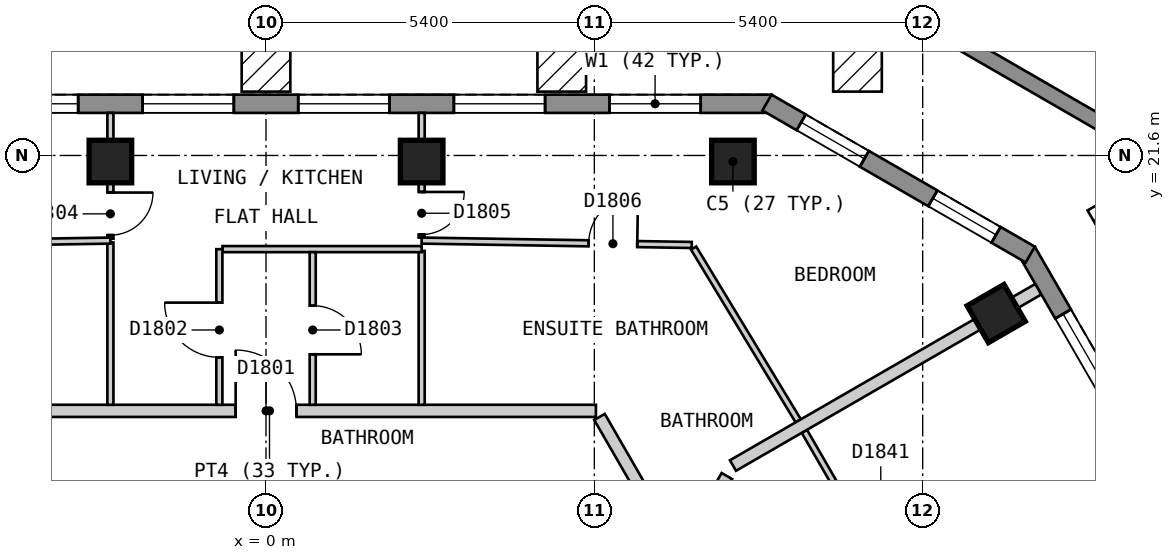
"""IFC4 building model, lengths in metres.
Left out: names, types, materials, properties, quantities, classifications, styles, units other than length and angle.
Written with IfcOpenShell. Run it as: python <this file> out.ifc"""

import sys

from ifc_helpers import new_model, si_unit, direction, frame, frame_2d, origin, origin_2d, place, context, subcontext, project, spatial, polyline, rectangle, outline, extrude, element, fill, save


model = new_model("IFC4")
c1 = context("Model", 3, precision=1e-05, world=origin(), true_north=direction((0.0, 1.0)))
c2 = subcontext(c1, "Body", "Model", "MODEL_VIEW")
j1 = project(units=[si_unit("LENGTHUNIT", "METRE"), si_unit("PLANEANGLEUNIT", "RADIAN")], contexts=[c1])
p1 = place(None, origin())
s1 = spatial("IfcSite", under=j1, at=p1, CompositionType="ELEMENT")
p2 = place(p1, origin())
s2 = spatial("IfcBuilding", under=s1, at=p2, CompositionType="ELEMENT")
p3 = place(p2, frame((0.0, 0.0, 202.8)))
s3 = spatial("IfcBuildingStorey", under=s2, at=p3, CompositionType="ELEMENT", Elevation=202.8)
for number, where, z_axis, x_axis in (
    (1, (7.679, 21.5, 0.0), (0.0, 0.0, 1.0), (-1.0, 0.0, 0.0)),
    (2, (2.56, 21.5, 0.0), (0.0, 0.0, 1.0), (-1.0, 0.0, 0.0)),
    (3, (-2.559, 21.5, 0.0), (0.0, 0.0, 1.0), (-1.0, 0.0, 0.0)),
    (4, (12.009, 19.0, 0.0), (0.0, 0.0, 1.0), (-0.5, 0.866, 0.0)),
):
    element("IfcColumn", number, at=place(p3, frame(where, z_axis=z_axis, x_axis=x_axis)), inside=s3, PredefinedType="COLUMN", context=c2, shape_type="SweptSolid", body=[
        extrude(rectangle(XDim=0.7, YDim=0.7, at=origin_2d()), origin(), (0.0, 0.0, 1.0), 3.0),
    ])
p4 = place(p3, frame((8.314, 22.45, 0.0), z_axis=(0.0, 0.0, 1.0), x_axis=(-1.0, 0.0, 0.0)))
e5 = element("IfcWall", 5, at=p4, inside=s3, PredefinedType="SOLIDWALL", context=c2, shape_type="SweptSolid", body=[
    extrude(outline(polyline([(0.0, -0.15), (16.628, -0.15), (16.548, 0.15), (0.08, 0.15), (0.0, -0.15)])), origin(), (0.0, 0.0, 1.0), 2.7),
])
p5 = place(p4, frame((1.165, 0.0, 0.15)))
e6 = element("IfcOpeningElement", 6, at=p5, cuts=e5, PredefinedType="OPENING", context=c2, shape_type="SweptSolid", body=[
    extrude(rectangle(XDim=1.5, YDim=2.1, at=frame_2d((0.75, 1.05))), frame((0.0, 0.16, 0.0), z_axis=(0.0, -1.0, 0.0), x_axis=(1.0, 0.0, 0.0)), (0.0, 0.0, 1.0), 0.32),
])
p6 = place(p4, frame((3.724, 0.0, 0.15)))
e7 = element("IfcOpeningElement", 7, at=p6, cuts=e5, PredefinedType="OPENING", context=c2, shape_type="SweptSolid", body=[
    extrude(rectangle(XDim=1.5, YDim=2.1, at=frame_2d((0.75, 1.05))), frame((0.0, 0.16, 0.0), z_axis=(0.0, -1.0, 0.0), x_axis=(1.0, 0.0, 0.0)), (0.0, 0.0, 1.0), 0.32),
])
p7 = place(p4, frame((6.284, 0.0, 0.15)))
e8 = element("IfcOpeningElement", 8, at=p7, cuts=e5, PredefinedType="OPENING", context=c2, shape_type="SweptSolid", body=[
    extrude(rectangle(XDim=1.5, YDim=2.1, at=frame_2d((0.75, 1.05))), frame((0.0, 0.16, 0.0), z_axis=(0.0, -1.0, 0.0), x_axis=(1.0, 0.0, 0.0)), (0.0, 0.0, 1.0), 0.32),
])
p8 = place(p4, frame((8.843, 0.0, 0.15)))
e9 = element("IfcOpeningElement", 9, at=p8, cuts=e5, PredefinedType="OPENING", context=c2, shape_type="SweptSolid", body=[
    extrude(rectangle(XDim=1.5, YDim=2.1, at=frame_2d((0.75, 1.05))), frame((0.0, 0.16, 0.0), z_axis=(0.0, -1.0, 0.0), x_axis=(1.0, 0.0, 0.0)), (0.0, 0.0, 1.0), 0.32),
])
p9 = place(p4, frame((11.403, 0.0, 0.15)))
e10 = element("IfcOpeningElement", 10, at=p9, cuts=e5, PredefinedType="OPENING", context=c2, shape_type="SweptSolid", body=[
    extrude(rectangle(XDim=1.5, YDim=2.1, at=frame_2d((0.75, 1.05))), frame((0.0, 0.16, 0.0), z_axis=(0.0, -1.0, 0.0), x_axis=(1.0, 0.0, 0.0)), (0.0, 0.0, 1.0), 0.32),
])
p10 = place(p4, frame((13.962, 0.0, 0.15)))
e11 = element("IfcOpeningElement", 11, at=p10, cuts=e5, PredefinedType="OPENING", context=c2, shape_type="SweptSolid", body=[
    extrude(rectangle(XDim=1.5, YDim=2.1, at=frame_2d((0.75, 1.05))), frame((0.0, 0.16, 0.0), z_axis=(0.0, -1.0, 0.0), x_axis=(1.0, 0.0, 0.0)), (0.0, 0.0, 1.0), 0.32),
])
p11 = place(p3, frame((23.599, 0.825, 0.0), z_axis=(0.0, 0.0, 1.0), x_axis=(-0.500003656944, 0.866023292436, 0.0)))
e12 = element("IfcWall", 12, at=p11, inside=s3, PredefinedType="SOLIDWALL", context=c2, shape_type="SweptSolid", body=[
    extrude(outline(polyline([(0.0, -0.15), (22.17, -0.15), (22.09, 0.15), (0.08, 0.15), (0.0, -0.15)])), origin(), (0.0, 0.0, 1.0), 2.7),
])
p12 = place(p11, frame((1.191, 0.0, 0.15)))
e13 = element("IfcOpeningElement", 13, at=p12, cuts=e12, PredefinedType="OPENING", context=c2, shape_type="SweptSolid", body=[
    extrude(rectangle(XDim=1.5, YDim=2.1, at=frame_2d((0.75, 1.05))), frame((0.0, 0.16, 0.0), z_axis=(0.0, -1.0, 0.0), x_axis=(1.0, 0.0, 0.0)), (0.0, 0.0, 1.0), 0.32),
])
p13 = place(p11, frame((3.804, 0.0, 0.15)))
e14 = element("IfcOpeningElement", 14, at=p13, cuts=e12, PredefinedType="OPENING", context=c2, shape_type="SweptSolid", body=[
    extrude(rectangle(XDim=1.5, YDim=2.1, at=frame_2d((0.75, 1.05))), frame((0.0, 0.16, 0.0), z_axis=(0.0, -1.0, 0.0), x_axis=(1.0, 0.0, 0.0)), (0.0, 0.0, 1.0), 0.32),
])
p14 = place(p11, frame((6.417, 0.0, 0.15)))
e15 = element("IfcOpeningElement", 15, at=p14, cuts=e12, PredefinedType="OPENING", context=c2, shape_type="SweptSolid", body=[
    extrude(rectangle(XDim=1.5, YDim=2.1, at=frame_2d((0.75, 1.05))), frame((0.0, 0.16, 0.0), z_axis=(0.0, -1.0, 0.0), x_axis=(1.0, 0.0, 0.0)), (0.0, 0.0, 1.0), 0.32),
])
p15 = place(p11, frame((9.029, 0.0, 0.15)))
e16 = element("IfcOpeningElement", 16, at=p15, cuts=e12, PredefinedType="OPENING", context=c2, shape_type="SweptSolid", body=[
    extrude(rectangle(XDim=1.5, YDim=2.1, at=frame_2d((0.75, 1.05))), frame((0.0, 0.16, 0.0), z_axis=(0.0, -1.0, 0.0), x_axis=(1.0, 0.0, 0.0)), (0.0, 0.0, 1.0), 0.32),
])
p16 = place(p11, frame((11.641, 0.0, 0.15)))
e17 = element("IfcOpeningElement", 17, at=p16, cuts=e12, PredefinedType="OPENING", context=c2, shape_type="SweptSolid", body=[
    extrude(rectangle(XDim=1.5, YDim=2.1, at=frame_2d((0.75, 1.05))), frame((0.0, 0.16, 0.0), z_axis=(0.0, -1.0, 0.0), x_axis=(1.0, 0.0, 0.0)), (0.0, 0.0, 1.0), 0.32),
])
p17 = place(p11, frame((14.254, 0.0, 0.15)))
e18 = element("IfcOpeningElement", 18, at=p17, cuts=e12, PredefinedType="OPENING", context=c2, shape_type="SweptSolid", body=[
    extrude(rectangle(XDim=1.5, YDim=2.1, at=frame_2d((0.75, 1.05))), frame((0.0, 0.16, 0.0), z_axis=(0.0, -1.0, 0.0), x_axis=(1.0, 0.0, 0.0)), (0.0, 0.0, 1.0), 0.32),
])
p18 = place(p11, frame((16.866, 0.0, 0.15)))
e19 = element("IfcOpeningElement", 19, at=p18, cuts=e12, PredefinedType="OPENING", context=c2, shape_type="SweptSolid", body=[
    extrude(rectangle(XDim=1.5, YDim=2.1, at=frame_2d((0.75, 1.05))), frame((0.0, 0.16, 0.0), z_axis=(0.0, -1.0, 0.0), x_axis=(1.0, 0.0, 0.0)), (0.0, 0.0, 1.0), 0.32),
])
p19 = place(p11, frame((19.479, 0.0, 0.15)))
e20 = element("IfcOpeningElement", 20, at=p19, cuts=e12, PredefinedType="OPENING", context=c2, shape_type="SweptSolid", body=[
    extrude(rectangle(XDim=1.5, YDim=2.1, at=frame_2d((0.75, 1.05))), frame((0.0, 0.16, 0.0), z_axis=(0.0, -1.0, 0.0), x_axis=(1.0, 0.0, 0.0)), (0.0, 0.0, 1.0), 0.32),
])
p20 = place(p3, frame((12.569, 19.97, 0.0), z_axis=(0.0, 0.0, 1.0), x_axis=(-0.866022959057, 0.500004234368, 0.0)))
e21 = element("IfcWall", 21, at=p20, inside=s3, PredefinedType="SOLIDWALL", context=c2, shape_type="SweptSolid", body=[
    extrude(outline(polyline([(0.0, -0.15), (5.0, -0.15), (4.92, 0.15), (0.08, 0.15), (0.0, -0.15)])), origin(), (0.0, 0.0, 1.0), 2.7),
])
p21 = place(p20, frame((0.65, 0.0, 0.15)))
e22 = element("IfcOpeningElement", 22, at=p21, cuts=e21, PredefinedType="OPENING", context=c2, shape_type="SweptSolid", body=[
    extrude(rectangle(XDim=1.2, YDim=2.1, at=frame_2d((0.6, 1.05))), frame((0.0, 0.16, 0.0), z_axis=(0.0, -1.0, 0.0), x_axis=(1.0, 0.0, 0.0)), (0.0, 0.0, 1.0), 0.32),
])
p22 = place(p20, frame((3.15, 0.0, 0.15)))
e23 = element("IfcOpeningElement", 23, at=p22, cuts=e21, PredefinedType="OPENING", context=c2, shape_type="SweptSolid", body=[
    extrude(rectangle(XDim=1.2, YDim=2.1, at=frame_2d((0.6, 1.05))), frame((0.0, 0.16, 0.0), z_axis=(0.0, -1.0, 0.0), x_axis=(1.0, 0.0, 0.0)), (0.0, 0.0, 1.0), 0.32),
])
p23 = place(p3, frame((10.33, 24.092, 0.0), z_axis=(0.0, 0.0, 1.0), x_axis=(0.865877295069, -0.50025644412, 0.0)))
e24 = element("IfcWall", 24, at=p23, inside=s3, PredefinedType="PARAPET", context=c2, shape_type="SweptSolid", body=[
    extrude(outline(polyline([(0.067, -0.125), (4.932, -0.125), (4.999, 0.125), (0.0, 0.125), (0.067, -0.125)])), origin(), (0.0, 0.0, 1.0), 1.6),
])
p24 = place(p3, frame((5.485, 17.3, 0.0), z_axis=(0.0, 0.0, 1.0), x_axis=(0.499943285704, -0.866058145322, 0.0)))
e25 = element("IfcWall", 25, at=p24, inside=s3, PredefinedType="PARTITIONING", context=c2, shape_type="SweptSolid", body=[
    extrude(rectangle(XDim=10.623, YDim=0.2, at=frame_2d((5.312, 0.0))), origin(), (0.0, 0.0, 1.0), 2.7),
])
p25 = place(p24, frame((3.901, 0.0, 0.0)))
e26 = element("IfcOpeningElement", 26, at=p25, cuts=e25, PredefinedType="OPENING", context=c2, shape_type="SweptSolid", body=[
    extrude(rectangle(XDim=1.0, YDim=2.1, at=frame_2d((0.5, 1.05))), frame((0.0, 0.11, 0.0), z_axis=(0.0, -1.0, 0.0), x_axis=(1.0, 0.0, 0.0)), (0.0, 0.0, 1.0), 0.22),
])
p26 = place(p3, frame((-5.311, 17.4, 0.0), z_axis=(0.0, 0.0, 1.0), x_axis=(1.0, 0.0, 0.0)))
e27 = element("IfcWall", 27, at=p26, inside=s3, PredefinedType="PARTITIONING", context=c2, shape_type="SweptSolid", body=[
    extrude(rectangle(XDim=10.737, YDim=0.2, at=frame_2d((5.369, 0.0))), origin(), (0.0, 0.0, 1.0), 2.7),
])
p27 = place(p26, frame((4.812, 0.0, 0.0)))
e28 = element("IfcOpeningElement", 28, at=p27, cuts=e27, PredefinedType="OPENING", context=c2, shape_type="SweptSolid", body=[
    extrude(rectangle(XDim=1.0, YDim=2.1, at=frame_2d((0.5, 1.05))), frame((0.0, 0.11, 0.0), z_axis=(0.0, -1.0, 0.0), x_axis=(1.0, 0.0, 0.0)), (0.0, 0.0, 1.0), 0.22),
])
p28 = place(p3, frame((7.033, 20.077, 0.0), z_axis=(0.0, 0.0, 1.0), x_axis=(0.517918779664, -0.855429797044, 0.0)))
e29 = element("IfcWall", 29, at=p28, inside=s3, PredefinedType="PARTITIONING", context=c2, shape_type="SweptSolid", body=[
    extrude(rectangle(XDim=3.321, YDim=0.1, at=frame_2d((1.661, 0.0))), origin(), (0.0, 0.0, 1.0), 2.7),
])
p29 = place(p3, frame((8.854, 17.064, 0.0), z_axis=(0.0, 0.0, 1.0), x_axis=(0.500042049778, -0.866001124973, 0.0)))
e30 = element("IfcWall", 30, at=p29, inside=s3, PredefinedType="PARTITIONING", context=c2, shape_type="SweptSolid", body=[
    extrude(rectangle(XDim=5.025, YDim=0.1, at=frame_2d((2.513, 0.0))), origin(), (0.0, 0.0, 1.0), 2.7),
])
p30 = place(p29, frame((2.063, 0.0, 0.0)))
e31 = element("IfcOpeningElement", 31, at=p30, cuts=e30, PredefinedType="OPENING", context=c2, shape_type="SweptSolid", body=[
    extrude(rectangle(XDim=0.9, YDim=2.1, at=frame_2d((0.45, 1.05))), frame((0.0, 0.06, 0.0), z_axis=(0.0, -1.0, 0.0), x_axis=(1.0, 0.0, 0.0)), (0.0, 0.0, 1.0), 0.12),
])
p31 = place(p3, frame((-2.559, 20.17, 0.0), z_axis=(0.0, 0.0, 1.0), x_axis=(0.0, -1.0, 0.0)))
e32 = element("IfcWall", 32, at=p31, inside=s3, PredefinedType="PARTITIONING", context=c2, shape_type="SweptSolid", body=[
    extrude(rectangle(XDim=2.67, YDim=0.1, at=frame_2d((1.335, 0.0))), origin(), (0.0, 0.0, 1.0), 2.7),
])
p32 = place(p3, frame((2.56, 22.3, 0.0), z_axis=(0.0, 0.0, 1.0), x_axis=(0.0, -1.0, 0.0)))
e33 = element("IfcWall", 33, at=p32, inside=s3, PredefinedType="PARTITIONING", context=c2, shape_type="SweptSolid", body=[
    extrude(rectangle(XDim=2.05, YDim=0.1, at=frame_2d((1.025, 0.0))), origin(), (0.0, 0.0, 1.0), 2.7),
])
p33 = place(p32, frame((1.3, 0.0, 0.0)))
e34 = element("IfcOpeningElement", 34, at=p33, cuts=e33, PredefinedType="OPENING", context=c2, shape_type="SweptSolid", body=[
    extrude(rectangle(XDim=0.7, YDim=2.1, at=frame_2d((0.35, 1.05))), frame((0.0, 0.06, 0.0), z_axis=(0.0, -1.0, 0.0), x_axis=(1.0, 0.0, 0.0)), (0.0, 0.0, 1.0), 0.12),
])
p34 = place(p3, frame((2.56, 20.03, 0.0), z_axis=(0.0, 0.0, 1.0), x_axis=(0.0, -1.0, 0.0)))
e35 = element("IfcWall", 35, at=p34, inside=s3, PredefinedType="PARTITIONING", context=c2, shape_type="SweptSolid", body=[
    extrude(rectangle(XDim=2.53, YDim=0.1, at=frame_2d((1.265, 0.0))), origin(), (0.0, 0.0, 1.0), 2.7),
])
p35 = place(p3, frame((2.56, 20.2, 0.0), z_axis=(0.0, 0.0, 1.0), x_axis=(0.999868576801, -0.016212005615, 0.0)))
e36 = element("IfcWall", 36, at=p35, inside=s3, PredefinedType="PARTITIONING", context=c2, shape_type="SweptSolid", body=[
    extrude(rectangle(XDim=4.442, YDim=0.1, at=frame_2d((2.221, 0.0))), origin(), (0.0, 0.0, 1.0), 2.7),
])
p36 = place(p35, frame((2.746, 0.0, 0.0)))
e37 = element("IfcOpeningElement", 37, at=p36, cuts=e36, PredefinedType="OPENING", context=c2, shape_type="SweptSolid", body=[
    extrude(rectangle(XDim=0.8, YDim=2.1, at=frame_2d((0.4, 1.05))), frame((0.0, 0.06, 0.0), z_axis=(0.0, -1.0, 0.0), x_axis=(1.0, 0.0, 0.0)), (0.0, 0.0, 1.0), 0.12),
])
p37 = place(p3, frame((-0.716, 20.06, 0.0), z_axis=(0.0, 0.0, 1.0), x_axis=(1.0, 0.0, 0.0)))
e38 = element("IfcWall", 38, at=p37, inside=s3, PredefinedType="PARTITIONING", context=c2, shape_type="SweptSolid", body=[
    extrude(rectangle(XDim=3.276, YDim=0.1, at=frame_2d((1.638, 0.0))), origin(), (0.0, 0.0, 1.0), 2.7),
])
p38 = place(p3, frame((0.768, 17.5, 0.0), z_axis=(0.0, 0.0, 1.0), x_axis=(0.0, 1.0, 0.0)))
e39 = element("IfcWall", 39, at=p38, inside=s3, PredefinedType="PARTITIONING", context=c2, shape_type="SweptSolid", body=[
    extrude(rectangle(XDim=2.51, YDim=0.1, at=frame_2d((1.255, 0.0))), origin(), (0.0, 0.0, 1.0), 2.7),
])
p39 = place(p38, frame((0.83, 0.0, 0.0)))
e40 = element("IfcOpeningElement", 40, at=p39, cuts=e39, PredefinedType="OPENING", context=c2, shape_type="SweptSolid", body=[
    extrude(rectangle(XDim=0.8, YDim=2.1, at=frame_2d((0.4, 1.05))), frame((0.0, 0.06, 0.0), z_axis=(0.0, -1.0, 0.0), x_axis=(1.0, 0.0, 0.0)), (0.0, 0.0, 1.0), 0.12),
])
p40 = place(p3, frame((-0.767, 17.5, 0.0), z_axis=(0.0, 0.0, 1.0), x_axis=(0.0, 1.0, 0.0)))
e41 = element("IfcWall", 41, at=p40, inside=s3, PredefinedType="PARTITIONING", context=c2, shape_type="SweptSolid", body=[
    extrude(rectangle(XDim=2.559, YDim=0.1, at=frame_2d((1.28, 0.0))), origin(), (0.0, 0.0, 1.0), 2.7),
])
p41 = place(p40, frame((0.78, 0.0, 0.0)))
e42 = element("IfcOpeningElement", 42, at=p41, cuts=e41, PredefinedType="OPENING", context=c2, shape_type="SweptSolid", body=[
    extrude(rectangle(XDim=0.9, YDim=2.1, at=frame_2d((0.45, 1.05))), frame((0.0, 0.06, 0.0), z_axis=(0.0, -1.0, 0.0), x_axis=(1.0, 0.0, 0.0)), (0.0, 0.0, 1.0), 0.12),
])
p42 = place(p3, frame((-2.559, 20.23, 0.0), z_axis=(0.0, 0.0, 1.0), x_axis=(0.0, 1.0, 0.0)))
e43 = element("IfcWall", 43, at=p42, inside=s3, PredefinedType="PARTITIONING", context=c2, shape_type="SweptSolid", body=[
    extrude(rectangle(XDim=2.07, YDim=0.1, at=frame_2d((1.035, 0.0))), origin(), (0.0, 0.0, 1.0), 2.7),
])
p43 = place(p42, frame((0.06, 0.0, 0.0)))
e44 = element("IfcOpeningElement", 44, at=p43, cuts=e43, PredefinedType="OPENING", context=c2, shape_type="SweptSolid", body=[
    extrude(rectangle(XDim=0.7, YDim=2.1, at=frame_2d((0.35, 1.05))), frame((0.0, 0.06, 0.0), z_axis=(0.0, -1.0, 0.0), x_axis=(1.0, 0.0, 0.0)), (0.0, 0.0, 1.0), 0.12),
])
p44 = place(p3, frame((-7.002, 20.128, 0.0), z_axis=(0.0, 0.0, 1.0), x_axis=(0.999868634558, 0.016208443081, 0.0)))
e45 = element("IfcWall", 45, at=p44, inside=s3, PredefinedType="PARTITIONING", context=c2, shape_type="SweptSolid", body=[
    extrude(rectangle(XDim=4.443, YDim=0.1, at=frame_2d((2.222, 0.0))), origin(), (0.0, 0.0, 1.0), 2.7),
])
p45 = place(p44, frame((1.475, 0.0, 0.0)))
e46 = element("IfcOpeningElement", 46, at=p45, cuts=e45, PredefinedType="OPENING", context=c2, shape_type="SweptSolid", body=[
    extrude(rectangle(XDim=0.8, YDim=2.1, at=frame_2d((0.4, 1.05))), frame((0.0, 0.06, 0.0), z_axis=(0.0, -1.0, 0.0), x_axis=(1.0, 0.0, 0.0)), (0.0, 0.0, 1.0), 0.12),
])
p46 = place(p3, frame((6.871, 15.1, 0.0), z_axis=(0.0, 0.0, 1.0), x_axis=(0.50006528296, 0.865987709369, 0.0)))
e47 = element("IfcWall", 47, at=p46, inside=s3, PredefinedType="PARTITIONING", context=c2, shape_type="SweptSolid", body=[
    extrude(rectangle(XDim=1.418, YDim=0.2, at=frame_2d((0.709, 0.0))), origin(), (0.0, 0.0, 1.0), 2.7),
])
p47 = place(p3, frame((7.68, 16.501, 0.0), z_axis=(0.0, 0.0, 1.0), x_axis=(0.86602149507, 0.500006770031, 0.0)))
e48 = element("IfcWall", 48, at=p47, inside=s3, PredefinedType="PARTITIONING", context=c2, shape_type="SweptSolid", body=[
    extrude(rectangle(XDim=5.798, YDim=0.2, at=frame_2d((2.899, 0.0))), origin(), (0.0, 0.0, 1.0), 2.7),
])
p48 = place(p5, origin())
e49 = element("IfcWindow", 49, at=p48, inside=s3, PartitioningType="SINGLE_PANEL", PredefinedType="WINDOW", context=c2, shape_type="SweptSolid", body=[
    extrude(rectangle(XDim=1.5, YDim=2.1, at=frame_2d((0.75, 1.05))), frame((0.0, 0.03, 0.0), z_axis=(0.0, -1.0, 0.0), x_axis=(1.0, 0.0, 0.0)), (0.0, 0.0, 1.0), 0.06),
])
fill(e6, e49)
p49 = place(p6, origin())
e50 = element("IfcWindow", 50, at=p49, inside=s3, PartitioningType="SINGLE_PANEL", PredefinedType="WINDOW", context=c2, shape_type="SweptSolid", body=[
    extrude(rectangle(XDim=1.5, YDim=2.1, at=frame_2d((0.75, 1.05))), frame((0.0, 0.03, 0.0), z_axis=(0.0, -1.0, 0.0), x_axis=(1.0, 0.0, 0.0)), (0.0, 0.0, 1.0), 0.06),
])
fill(e7, e50)
p50 = place(p7, origin())
e51 = element("IfcWindow", 51, at=p50, inside=s3, PartitioningType="SINGLE_PANEL", PredefinedType="WINDOW", context=c2, shape_type="SweptSolid", body=[
    extrude(rectangle(XDim=1.5, YDim=2.1, at=frame_2d((0.75, 1.05))), frame((0.0, 0.03, 0.0), z_axis=(0.0, -1.0, 0.0), x_axis=(1.0, 0.0, 0.0)), (0.0, 0.0, 1.0), 0.06),
])
fill(e8, e51)
p51 = place(p8, origin())
e52 = element("IfcWindow", 52, at=p51, inside=s3, PartitioningType="SINGLE_PANEL", PredefinedType="WINDOW", context=c2, shape_type="SweptSolid", body=[
    extrude(rectangle(XDim=1.5, YDim=2.1, at=frame_2d((0.75, 1.05))), frame((0.0, 0.03, 0.0), z_axis=(0.0, -1.0, 0.0), x_axis=(1.0, 0.0, 0.0)), (0.0, 0.0, 1.0), 0.06),
])
fill(e9, e52)
p52 = place(p9, origin())
e53 = element("IfcWindow", 53, at=p52, inside=s3, PartitioningType="SINGLE_PANEL", PredefinedType="WINDOW", context=c2, shape_type="SweptSolid", body=[
    extrude(rectangle(XDim=1.5, YDim=2.1, at=frame_2d((0.75, 1.05))), frame((0.0, 0.03, 0.0), z_axis=(0.0, -1.0, 0.0), x_axis=(1.0, 0.0, 0.0)), (0.0, 0.0, 1.0), 0.06),
])
fill(e10, e53)
p53 = place(p19, origin())
e54 = element("IfcWindow", 54, at=p53, inside=s3, PartitioningType="SINGLE_PANEL", PredefinedType="WINDOW", context=c2, shape_type="SweptSolid", body=[
    extrude(rectangle(XDim=1.5, YDim=2.1, at=frame_2d((0.75, 1.05))), frame((0.0, 0.03, 0.0), z_axis=(0.0, -1.0, 0.0), x_axis=(1.0, 0.0, 0.0)), (0.0, 0.0, 1.0), 0.06),
])
fill(e20, e54)
p54 = place(p21, origin())
e55 = element("IfcWindow", 55, at=p54, inside=s3, PartitioningType="SINGLE_PANEL", PredefinedType="WINDOW", context=c2, shape_type="SweptSolid", body=[
    extrude(rectangle(XDim=1.2, YDim=2.1, at=frame_2d((0.6, 1.05))), frame((0.0, 0.03, 0.0), z_axis=(0.0, -1.0, 0.0), x_axis=(1.0, 0.0, 0.0)), (0.0, 0.0, 1.0), 0.06),
])
fill(e22, e55)
p55 = place(p22, origin())
e56 = element("IfcWindow", 56, at=p55, inside=s3, PartitioningType="SINGLE_PANEL", PredefinedType="WINDOW", context=c2, shape_type="SweptSolid", body=[
    extrude(rectangle(XDim=1.2, YDim=2.1, at=frame_2d((0.6, 1.05))), frame((0.0, 0.03, 0.0), z_axis=(0.0, -1.0, 0.0), x_axis=(1.0, 0.0, 0.0)), (0.0, 0.0, 1.0), 0.06),
])
fill(e23, e56)
p56 = place(p27, origin())
e57 = element("IfcDoor", 57, at=p56, inside=s3, OperationType="SINGLE_SWING_LEFT", PredefinedType="DOOR", context=c2, shape_type="SweptSolid", body=[
    extrude(rectangle(XDim=1.0, YDim=2.1, at=frame_2d((0.5, 1.05))), frame((0.0, 0.025, 0.0), z_axis=(0.0, -1.0, 0.0), x_axis=(1.0, 0.0, 0.0)), (0.0, 0.0, 1.0), 0.05),
])
fill(e28, e57)
p57 = place(p41, origin())
e58 = element("IfcDoor", 58, at=p57, inside=s3, OperationType="SINGLE_SWING_RIGHT", PredefinedType="DOOR", context=c2, shape_type="SweptSolid", body=[
    extrude(rectangle(XDim=0.9, YDim=2.1, at=frame_2d((0.45, 1.05))), frame((0.0, 0.025, 0.0), z_axis=(0.0, -1.0, 0.0), x_axis=(1.0, 0.0, 0.0)), (0.0, 0.0, 1.0), 0.05),
])
fill(e42, e58)
p58 = place(p39, origin())
e59 = element("IfcDoor", 59, at=p58, inside=s3, OperationType="SINGLE_SWING_LEFT", PredefinedType="DOOR", context=c2, shape_type="SweptSolid", body=[
    extrude(rectangle(XDim=0.8, YDim=2.1, at=frame_2d((0.4, 1.05))), frame((0.0, 0.025, 0.0), z_axis=(0.0, -1.0, 0.0), x_axis=(1.0, 0.0, 0.0)), (0.0, 0.0, 1.0), 0.05),
])
fill(e40, e59)
p59 = place(p43, origin())
e60 = element("IfcDoor", 60, at=p59, inside=s3, OperationType="SINGLE_SWING_RIGHT", PredefinedType="DOOR", context=c2, shape_type="SweptSolid", body=[
    extrude(rectangle(XDim=0.7, YDim=2.1, at=frame_2d((0.35, 1.05))), frame((0.0, 0.025, 0.0), z_axis=(0.0, -1.0, 0.0), x_axis=(1.0, 0.0, 0.0)), (0.0, 0.0, 1.0), 0.05),
])
fill(e44, e60)
p60 = place(p33, origin())
e61 = element("IfcDoor", 61, at=p60, inside=s3, OperationType="SINGLE_SWING_LEFT", PredefinedType="DOOR", context=c2, shape_type="SweptSolid", body=[
    extrude(rectangle(XDim=0.7, YDim=2.1, at=frame_2d((0.35, 1.05))), frame((0.0, 0.025, 0.0), z_axis=(0.0, -1.0, 0.0), x_axis=(1.0, 0.0, 0.0)), (0.0, 0.0, 1.0), 0.05),
])
fill(e34, e61)
p61 = place(p36, origin())
e62 = element("IfcDoor", 62, at=p61, inside=s3, OperationType="SINGLE_SWING_RIGHT", PredefinedType="DOOR", context=c2, shape_type="SweptSolid", body=[
    extrude(rectangle(XDim=0.8, YDim=2.1, at=frame_2d((0.4, 1.05))), frame((0.0, 0.025, 0.0), z_axis=(0.0, -1.0, 0.0), x_axis=(1.0, 0.0, 0.0)), (0.0, 0.0, 1.0), 0.05),
])
fill(e37, e62)
save(model, sys.argv[1])
